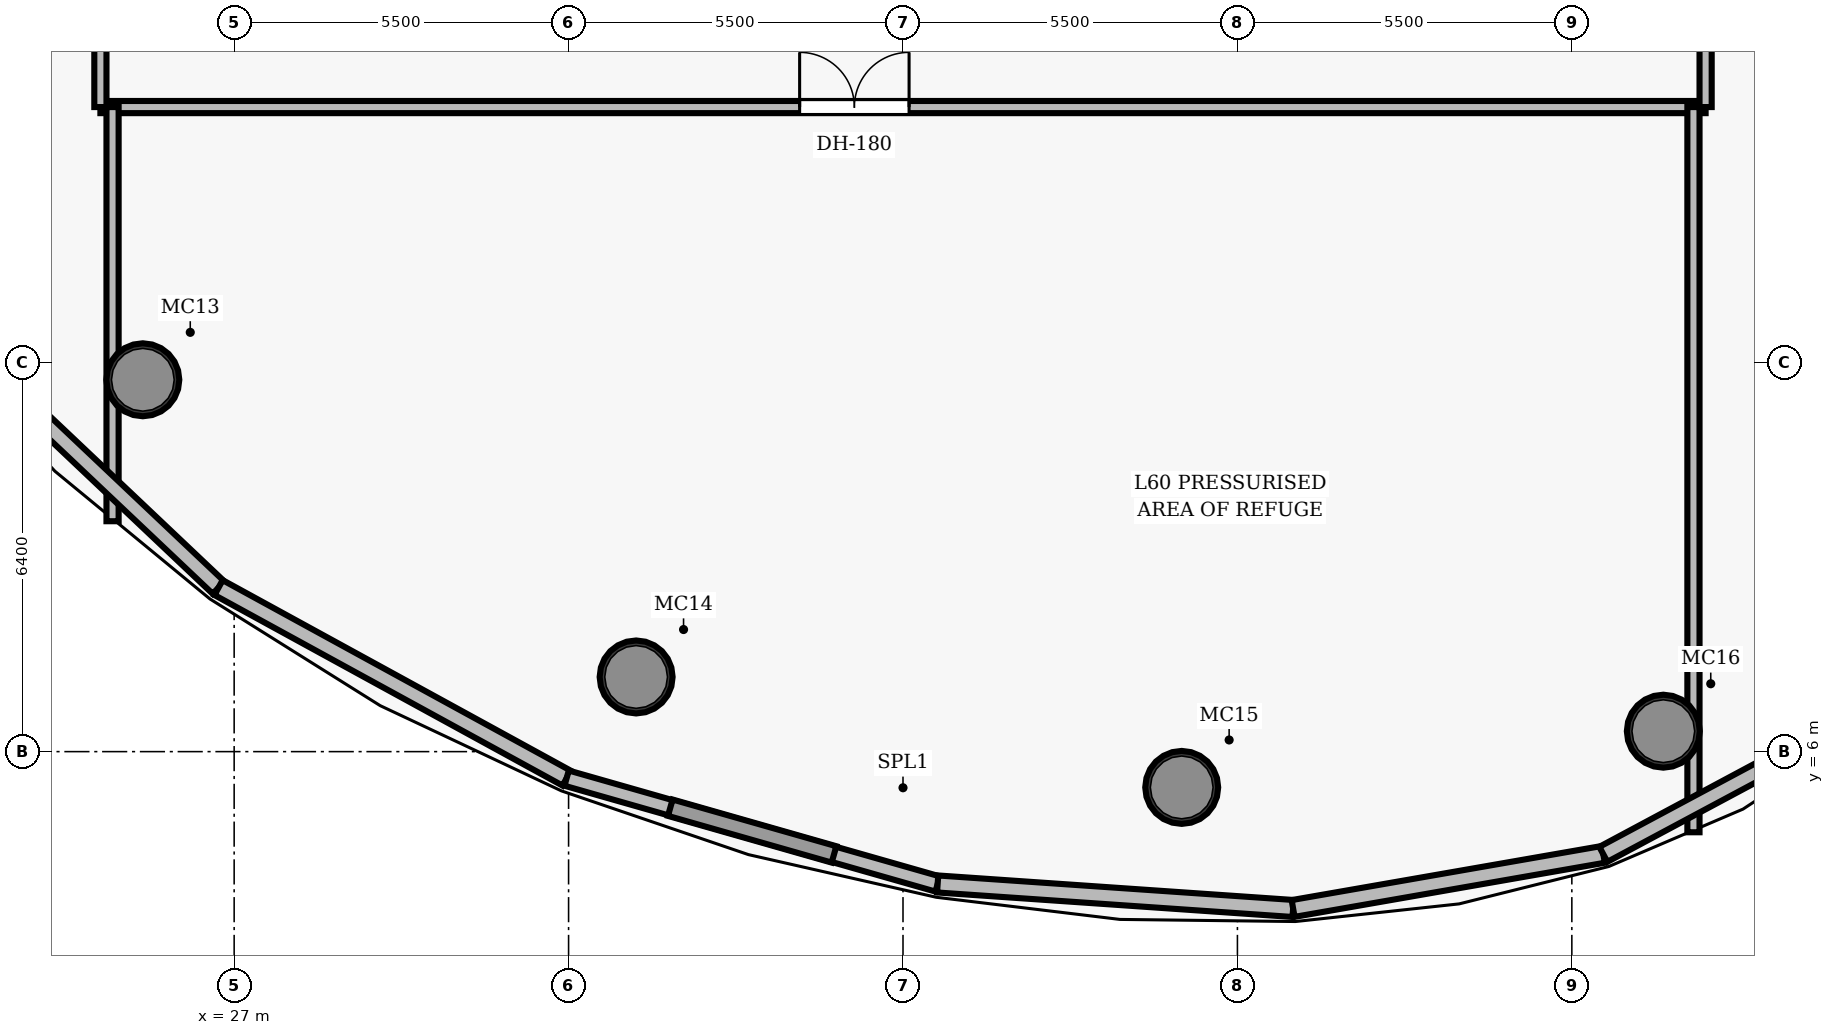
"""IFC4 building model, lengths in metres.
Left out: names, types, materials, properties, quantities, classifications, styles, units other than length and angle.
Written with IfcOpenShell. Run it as: python <this file> out.ifc"""

import sys

from ifc_helpers import new_model, si_unit, direction, frame, frame_2d, origin, origin_2d, place, context, subcontext, project, spatial, rectangle, hollow_circle, extrude, element, fill, save


model = new_model("IFC4")
c1 = context("Model", 3, precision=1e-05, world=origin(), true_north=direction((0.0, 1.0)))
c2 = subcontext(c1, "Body", "Model", "MODEL_VIEW")
j1 = project(units=[si_unit("LENGTHUNIT", "METRE"), si_unit("PLANEANGLEUNIT", "RADIAN")], contexts=[c1])
p1 = place(None, origin())
s1 = spatial("IfcSite", under=j1, at=p1, CompositionType="ELEMENT")
p2 = place(p1, origin())
s2 = spatial("IfcBuilding", under=s1, at=p2, CompositionType="ELEMENT")
p3 = place(p2, frame((0.0, 0.0, 236.65)))
s3 = spatial("IfcBuildingStorey", under=s2, at=p3, CompositionType="ELEMENT", Elevation=236.65)
for number, where, z_axis, x_axis in (
    (1, (25.498, 12.115, 0.0), (0.0, 0.0, 1.0), (1.0, 0.0, 0.0)),
    (2, (33.611, 7.228, 0.0), (0.0, 0.0, 1.0), (1.0, 0.0, 0.0)),
    (3, (42.584, 5.412, 0.0), (0.0, 0.0, 1.0), (1.0, 0.0, 0.0)),
    (4, (50.504, 6.336, 0.0), (0.0, 0.0, 1.0), (1.0, 0.0, 0.0)),
):
    element("IfcColumn", number, at=place(p3, frame(where, z_axis=z_axis, x_axis=x_axis)), inside=s3, PredefinedType="COLUMN", context=c2, shape_type="SweptSolid", body=[
        extrude(hollow_circle(Radius=0.6, WallThickness=0.05, at=origin_2d()), origin(), (0.0, 0.0, 1.0), 5.4),
    ])
p4 = place(p3, frame((24.8, 16.6, 0.0), z_axis=(0.0, 0.0, 1.0), x_axis=(1.0, 0.0, 0.0)))
e5 = element("IfcWall", 5, at=p4, inside=s3, PredefinedType="PARTITIONING", context=c2, shape_type="SweptSolid", body=[
    extrude(rectangle(XDim=26.4, YDim=0.2, at=frame_2d((13.2, 0.0))), origin(), (0.0, 0.0, 1.0), 4.04),
])
p5 = place(p4, frame((11.5, 0.0, 0.0)))
e6 = element("IfcOpeningElement", 6, at=p5, cuts=e5, PredefinedType="OPENING", context=c2, shape_type="SweptSolid", body=[
    extrude(rectangle(XDim=1.8, YDim=2.35, at=frame_2d((0.9, 1.175))), frame((0.0, 0.11, 0.0), z_axis=(0.0, -1.0, 0.0), x_axis=(1.0, 0.0, 0.0)), (0.0, 0.0, 1.0), 0.22),
])
p6 = place(p3, frame((24.8, 16.6, 0.0), z_axis=(0.0, 0.0, 1.0), x_axis=(0.0, 1.0, 0.0)))
e7 = element("IfcWall", 7, at=p6, inside=s3, PredefinedType="PARTITIONING", context=c2, shape_type="SweptSolid", body=[
    extrude(rectangle(XDim=18.8, YDim=0.2, at=frame_2d((9.4, 0.0))), origin(), (0.0, 0.0, 1.0), 4.04),
])
p7 = place(p6, frame((8.2, 0.0, 0.0)))
e8 = element("IfcOpeningElement", 8, at=p7, cuts=e7, PredefinedType="OPENING", context=c2, shape_type="SweptSolid", body=[
    extrude(rectangle(XDim=1.4, YDim=2.25, at=frame_2d((0.7, 1.125))), frame((0.0, 0.11, 0.0), z_axis=(0.0, -1.0, 0.0), x_axis=(1.0, 0.0, 0.0)), (0.0, 0.0, 1.0), 0.22),
])
p8 = place(p3, frame((51.2, 16.6, 0.0), z_axis=(0.0, 0.0, 1.0), x_axis=(0.0, 1.0, 0.0)))
e9 = element("IfcWall", 9, at=p8, inside=s3, PredefinedType="PARTITIONING", context=c2, shape_type="SweptSolid", body=[
    extrude(rectangle(XDim=18.8, YDim=0.2, at=frame_2d((9.4, 0.0))), origin(), (0.0, 0.0, 1.0), 4.04),
])
p9 = place(p8, frame((8.2, 0.0, 0.0)))
e10 = element("IfcOpeningElement", 10, at=p9, cuts=e9, PredefinedType="OPENING", context=c2, shape_type="SweptSolid", body=[
    extrude(rectangle(XDim=1.4, YDim=2.25, at=frame_2d((0.7, 1.125))), frame((0.0, 0.11, 0.0), z_axis=(0.0, -1.0, 0.0), x_axis=(1.0, 0.0, 0.0)), (0.0, 0.0, 1.0), 0.22),
])
p10 = place(p3, frame((25.0, 9.789, 0.0), z_axis=(0.0, 0.0, 1.0), x_axis=(0.0, 1.0, 0.0)))
e11 = element("IfcWall", 11, at=p10, inside=s3, PredefinedType="PARTITIONING", context=c2, shape_type="SweptSolid", body=[
    extrude(rectangle(XDim=6.811, YDim=0.2, at=frame_2d((3.406, 0.0))), origin(), (0.0, 0.0, 1.0), 4.04),
])
p11 = place(p3, frame((51.0, 4.674, 0.0), z_axis=(0.0, 0.0, 1.0), x_axis=(0.0, 1.0, 0.0)))
e12 = element("IfcWall", 12, at=p11, inside=s3, PredefinedType="PARTITIONING", context=c2, shape_type="SweptSolid", body=[
    extrude(rectangle(XDim=11.926, YDim=0.2, at=frame_2d((5.963, 0.0))), origin(), (0.0, 0.0, 1.0), 4.04),
])
p12 = place(p3, frame((26.743, 8.698, 0.0), z_axis=(0.0, 0.0, 1.0), x_axis=(-0.726362423444, 0.687311886852, 0.0)))
e13 = element("IfcWall", 13, at=p12, inside=s3, PredefinedType="SOLIDWALL", context=c2, shape_type="SweptSolid", body=[
    extrude(rectangle(XDim=6.527, YDim=0.28, at=frame_2d((3.264, 0.0))), origin(), (0.0, 0.0, 1.0), 4.98),
])
p13 = place(p3, frame((32.468, 5.564, 0.0), z_axis=(0.0, 0.0, 1.0), x_axis=(-0.877199815451, 0.480125487526, 0.0)))
e14 = element("IfcWall", 14, at=p13, inside=s3, PredefinedType="SOLIDWALL", context=c2, shape_type="SweptSolid", body=[
    extrude(rectangle(XDim=6.526, YDim=0.28, at=frame_2d((3.263, 0.0))), origin(), (0.0, 0.0, 1.0), 4.98),
])
p14 = place(p3, frame((38.57, 3.823, 0.0), z_axis=(0.0, 0.0, 1.0), x_axis=(-0.961634216747, 0.274334892386, 0.0)))
e15 = element("IfcWall", 15, at=p14, inside=s3, PredefinedType="SOLIDWALL", context=c2, shape_type="SweptSolid", body=[
    extrude(rectangle(XDim=6.345, YDim=0.26, at=frame_2d((3.173, 0.0))), origin(), (0.0, 0.0, 1.0), 4.98),
])
p15 = place(p3, frame((44.416, 3.42, 0.0), z_axis=(0.0, 0.0, 1.0), x_axis=(-0.997631610149, 0.068783504066, 0.0)))
e16 = element("IfcWall", 16, at=p15, inside=s3, PredefinedType="SOLIDWALL", context=c2, shape_type="SweptSolid", body=[
    extrude(rectangle(XDim=5.86, YDim=0.28, at=frame_2d((2.93, 0.0))), origin(), (0.0, 0.0, 1.0), 4.98),
])
p16 = place(p3, frame((49.518, 4.311, 0.0), z_axis=(0.0, 0.0, 1.0), x_axis=(-0.985120975094, -0.171862341509, 0.0)))
e17 = element("IfcWall", 17, at=p16, inside=s3, PredefinedType="SOLIDWALL", context=c2, shape_type="SweptSolid", body=[
    extrude(rectangle(XDim=5.179, YDim=0.28, at=frame_2d((2.59, 0.0))), origin(), (0.0, 0.0, 1.0), 4.98),
])
p17 = place(p3, frame((53.619, 6.505, 0.0), z_axis=(0.0, 0.0, 1.0), x_axis=(-0.88168357973, -0.471841144067, 0.0)))
e18 = element("IfcWall", 18, at=p17, inside=s3, PredefinedType="SOLIDWALL", context=c2, shape_type="SweptSolid", body=[
    extrude(rectangle(XDim=4.651, YDim=0.28, at=frame_2d((2.325, 0.0))), origin(), (0.0, 0.0, 1.0), 4.98),
])
p18 = place(p5, origin())
e19 = element("IfcDoor", 19, at=p18, inside=s3, OperationType="DOUBLE_DOOR_SINGLE_SWING", PredefinedType="DOOR", context=c2, shape_type="SweptSolid", body=[
    extrude(rectangle(XDim=1.8, YDim=2.35, at=frame_2d((0.9, 1.175))), frame((0.0, 0.025, 0.0), z_axis=(0.0, -1.0, 0.0), x_axis=(1.0, 0.0, 0.0)), (0.0, 0.0, 1.0), 0.05),
])
fill(e6, e19)
save(model, sys.argv[1])
